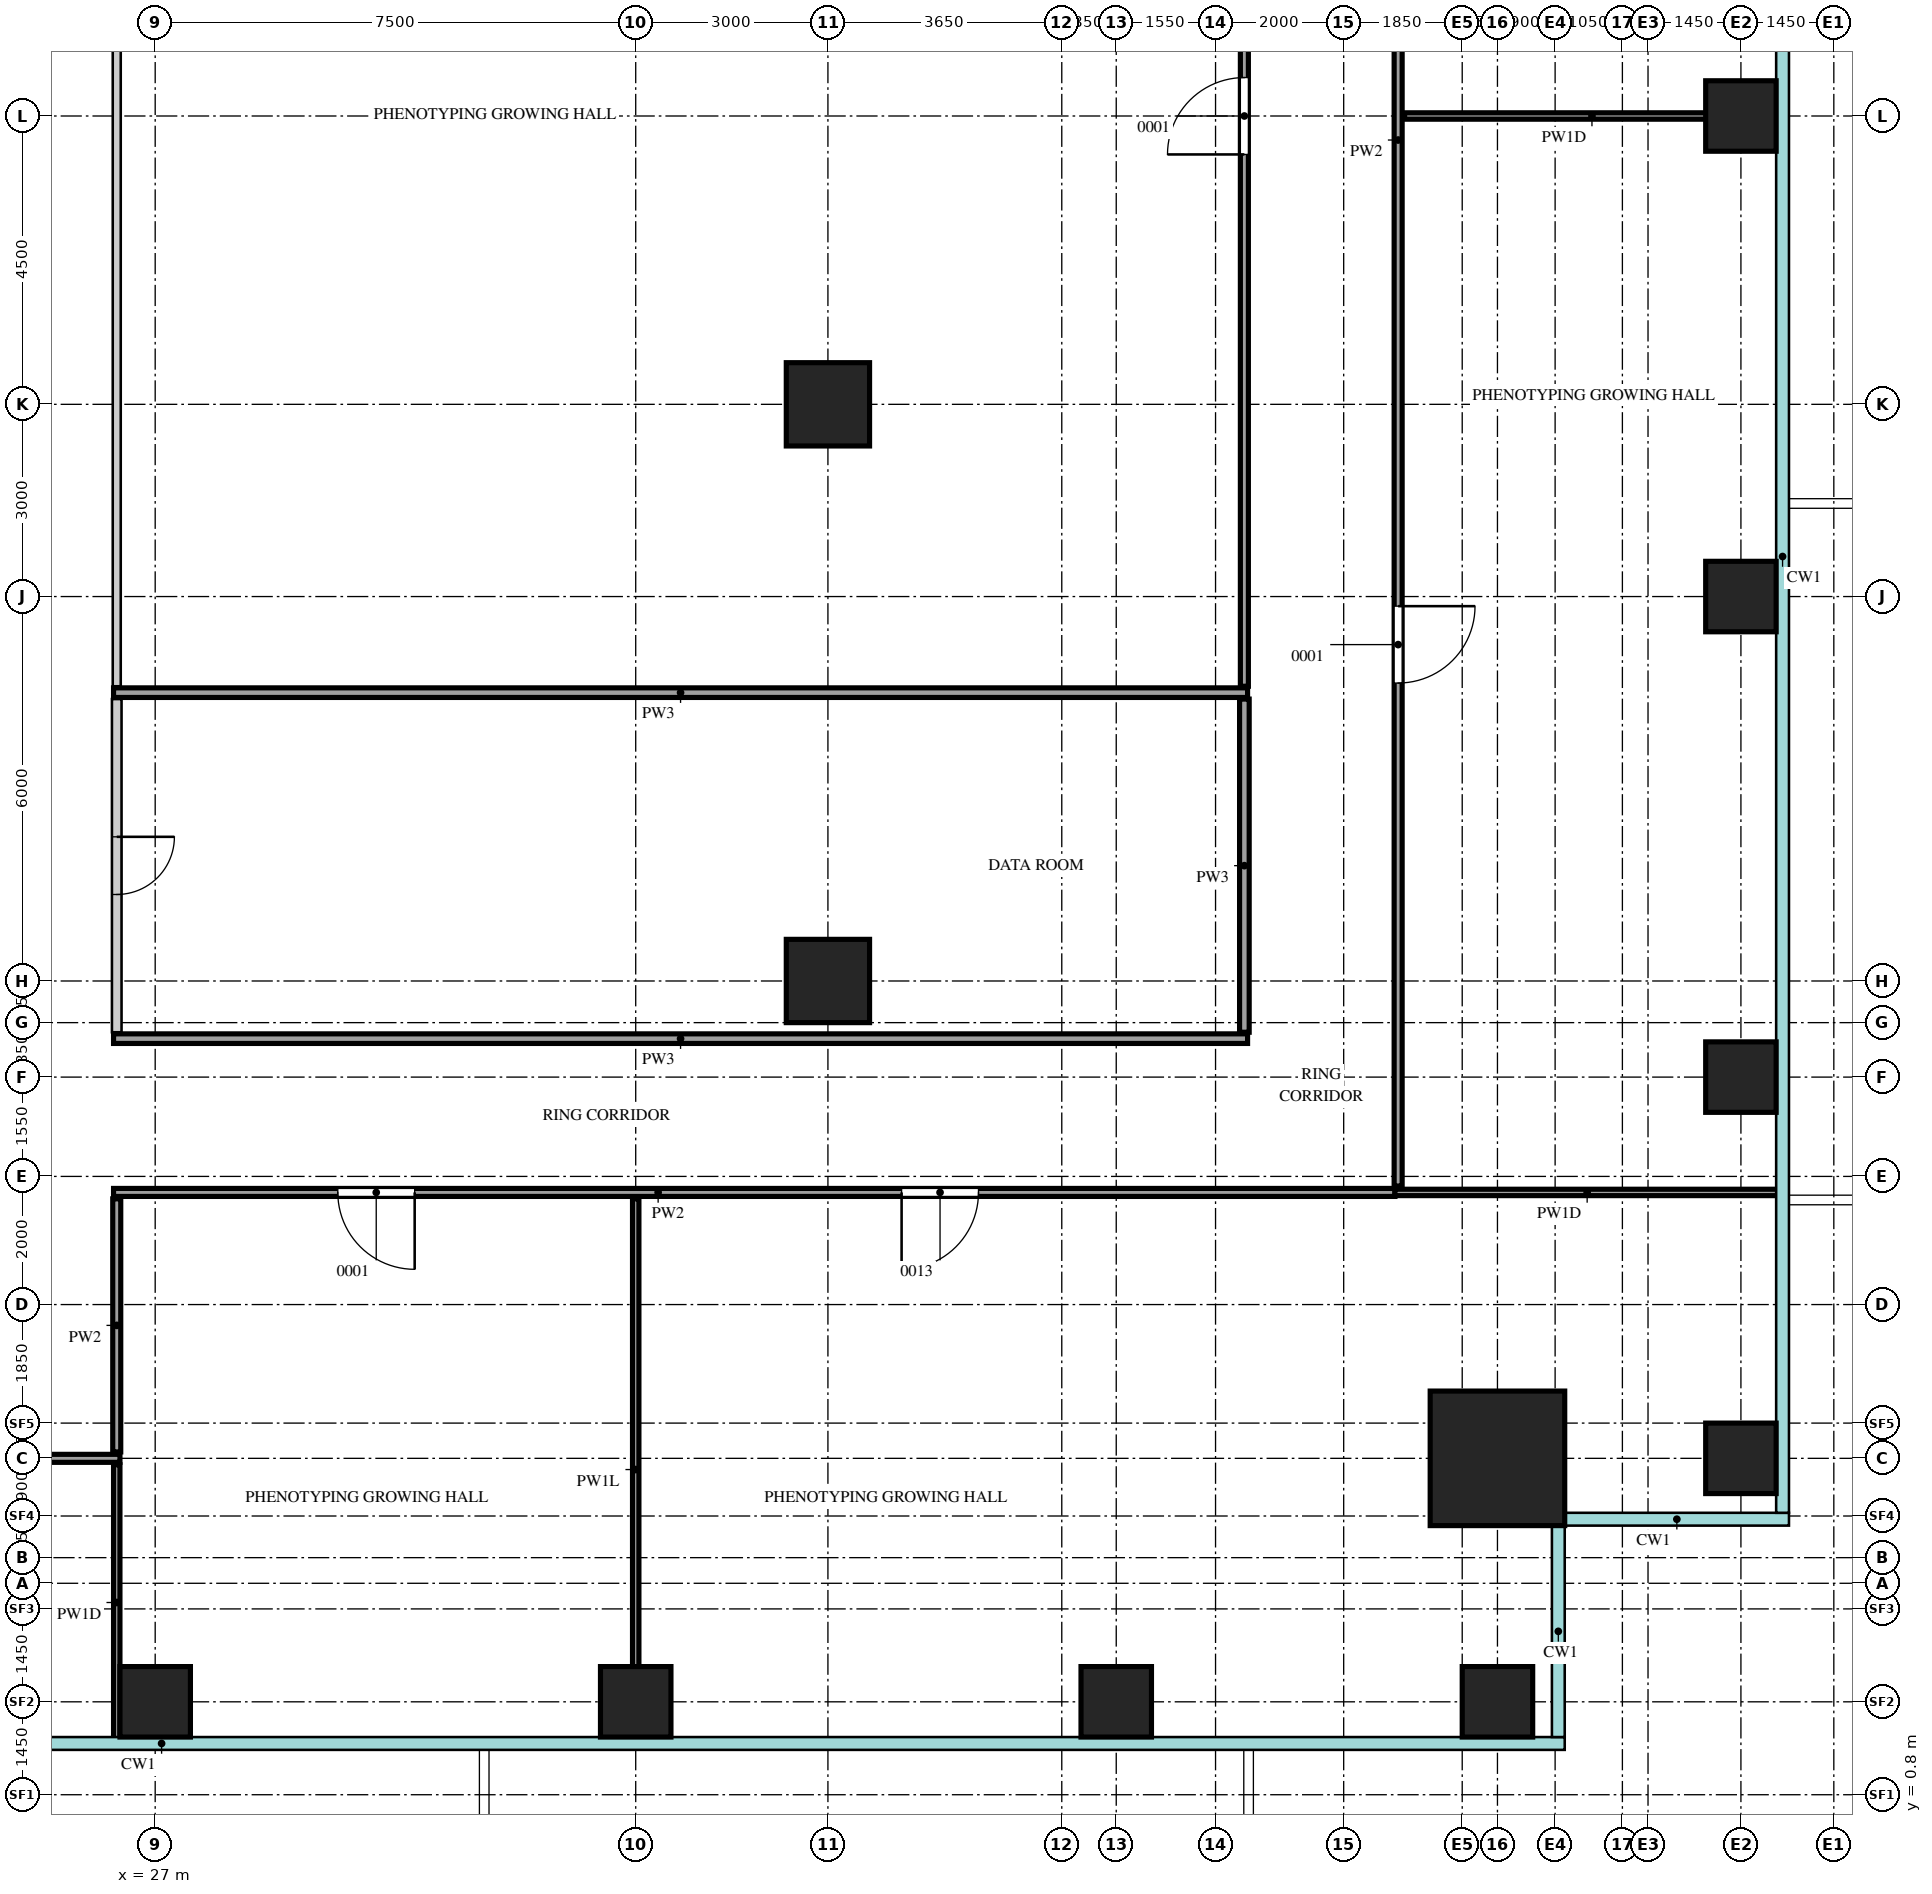
"""IFC4 building model, lengths in metres.
Left out: names, types, materials, properties, quantities, classifications, styles, units other than length and angle.
Written with IfcOpenShell. Run it as: python <this file> out.ifc"""

import sys

from ifc_helpers import new_model, si_unit, direction, frame, frame_2d, origin, origin_2d, place, context, subcontext, project, spatial, rectangle, extrude, source, transform, mapped, element, fill, save


model = new_model("IFC4")
c1 = context("Model", 3, precision=1e-05, world=origin(), true_north=direction((0.0, 1.0)))
c2 = subcontext(c1, "Body", "Model", "MODEL_VIEW")
j1 = project(units=[si_unit("LENGTHUNIT", "METRE"), si_unit("PLANEANGLEUNIT", "RADIAN")], contexts=[c1])
p1 = place(None, origin())
s1 = spatial("IfcSite", under=j1, at=p1, CompositionType="ELEMENT")
p2 = place(p1, origin())
s2 = spatial("IfcBuilding", under=s1, at=p2, CompositionType="ELEMENT")
p3 = place(p2, frame((0.0, 0.0, 136.7)))
s3 = spatial("IfcBuildingStorey", under=s2, at=p3, CompositionType="ELEMENT", Elevation=136.7)
m1 = source(origin(), c2, "Body", "SweptSolid", [
    extrude(rectangle(XDim=2.1, YDim=2.1, at=origin_2d()), origin(), (0.0, 0.0, 1.0), 4.4),
])
p4 = place(p3, frame((47.95, 6.05, 0.0), z_axis=(0.0, 0.0, 1.0), x_axis=(1.0, 0.0, 0.0)))
e1 = element("IfcColumn", 1, at=p4, inside=s3, PredefinedType="COLUMN", context=c2, shape_type="MappedRepresentation", body=[
    mapped(m1, transform((0.0, 0.0, 0.0))),
])
m2 = source(origin(), c2, "Body", "SweptSolid", [
    extrude(rectangle(XDim=1.1, YDim=1.1, at=origin_2d()), origin(), (0.0, 0.0, 1.0), 4.1),
])
for number, where, z_axis, x_axis in (
    (2, (27.0, 2.25, 0.0), (0.0, 0.0, 1.0), (1.0, 0.0, 0.0)),
    (3, (34.5, 2.25, 0.0), (0.0, 0.0, 1.0), (1.0, 0.0, 0.0)),
    (4, (42.0, 2.25, 0.0), (0.0, 0.0, 1.0), (1.0, 0.0, 0.0)),
    (5, (47.95, 2.25, 0.0), (0.0, 0.0, 1.0), (1.0, 0.0, 0.0)),
    (6, (51.75, 6.05, 0.0), (0.0, 0.0, 1.0), (1.0, 0.0, 0.0)),
    (7, (51.75, 12.0, 0.0), (0.0, 0.0, 1.0), (1.0, 0.0, 0.0)),
    (8, (51.75, 19.5, 0.0), (0.0, 0.0, 1.0), (1.0, 0.0, 0.0)),
    (9, (51.75, 27.0, 0.0), (0.0, 0.0, 1.0), (1.0, 0.0, 0.0)),
):
    element("IfcColumn", number, at=place(p3, frame(where, z_axis=z_axis, x_axis=x_axis)), inside=s3, PredefinedType="COLUMN", context=c2, shape_type="MappedRepresentation", body=[
        mapped(m2, transform((0.0, 0.0, 0.0))),
    ])
m3 = source(origin(), c2, "Body", "SweptSolid", [
    extrude(rectangle(XDim=1.3, YDim=1.3, at=origin_2d()), origin(), (0.0, 0.0, 1.0), 4.1),
])
for number, where, z_axis, x_axis in (
    (10, (37.5, 13.5, 0.0), (0.0, 0.0, 1.0), (1.0, 0.0, 0.0)),
    (11, (37.5, 22.5, 0.0), (0.0, 0.0, 1.0), (1.0, 0.0, 0.0)),
):
    element("IfcColumn", number, at=place(p3, frame(where, z_axis=z_axis, x_axis=x_axis)), inside=s3, PredefinedType="COLUMN", context=c2, shape_type="MappedRepresentation", body=[
        mapped(m3, transform((0.0, 0.0, 0.0))),
    ])
m4 = source(origin(), c2, "Body", "SweptSolid", [
    extrude(rectangle(XDim=4.3, YDim=0.1, at=frame_2d((2.15, 0.0))), origin(), (0.0, 0.0, 1.0), 4.2),
])
p5 = place(p3, frame((26.4, 1.65, 0.0), z_axis=(0.0, 0.0, 1.0), x_axis=(0.0, 1.0, 0.0)))
e12 = element("IfcWall", 12, at=p5, inside=s3, PredefinedType="PARTITIONING", context=c2, shape_type="MappedRepresentation", body=[
    mapped(m4, transform((0.0, 0.0, 0.0))),
])
m5 = source(origin(), c2, "Body", "SweptSolid", [
    extrude(rectangle(XDim=8.45, YDim=0.1, at=frame_2d((4.225, 0.0))), origin(), (0.0, 0.0, 1.0), 3.6),
])
p6 = place(p3, frame((34.5, 1.65, 0.0), z_axis=(0.0, 0.0, 1.0), x_axis=(0.0, 1.0, 0.0)))
e13 = element("IfcWall", 13, at=p6, inside=s3, PredefinedType="PARTITIONING", context=c2, shape_type="MappedRepresentation", body=[
    mapped(m5, transform((0.0, 0.0, 0.0))),
])
m6 = source(origin(), c2, "Body", "SweptSolid", [
    extrude(rectangle(XDim=22.3, YDim=0.125, at=frame_2d((11.15, 0.0))), origin(), (0.0, 0.0, 1.0), 3.55),
])
p7 = place(p3, frame((4.15, 6.05, 0.0), z_axis=(0.0, 0.0, 1.0), x_axis=(1.0, 0.0, 0.0)))
e14 = element("IfcWall", 14, at=p7, inside=s3, PredefinedType="PARTITIONING", context=c2, shape_type="MappedRepresentation", body=[
    mapped(m6, transform((0.0, 0.0, 0.0))),
])
m7 = source(origin(), c2, "Body", "SweptSolid", [
    extrude(rectangle(XDim=0.9, YDim=2.1, at=frame_2d((0.45, 1.05))), frame((0.0, 0.073, 0.0), z_axis=(0.0, -1.0, 0.0), x_axis=(1.0, 0.0, 0.0)), (0.0, 0.0, 1.0), 0.145),
])
p8 = place(p7, frame((10.7, 0.0, 0.0)))
e15 = element("IfcOpeningElement", 15, at=p8, cuts=e14, PredefinedType="OPENING", context=c2, shape_type="MappedRepresentation", body=[
    mapped(m7, transform((0.0, 0.0, 0.0))),
])
m8 = source(origin(), c2, "Body", "SweptSolid", [
    extrude(rectangle(XDim=3.95, YDim=0.125, at=frame_2d((1.975, 0.0))), origin(), (0.0, 0.0, 1.0), 4.2),
])
p9 = place(p3, frame((26.4, 6.15, 0.0), z_axis=(0.0, 0.0, 1.0), x_axis=(0.0, 1.0, 0.0)))
e16 = element("IfcWall", 16, at=p9, inside=s3, PredefinedType="PARTITIONING", context=c2, shape_type="MappedRepresentation", body=[
    mapped(m8, transform((0.0, 0.0, 0.0))),
])
m9 = source(origin(), c2, "Body", "SweptSolid", [
    extrude(rectangle(XDim=20.0, YDim=0.125, at=frame_2d((10.0, 0.0))), origin(), (0.0, 0.0, 1.0), 4.2),
])
p10 = place(p3, frame((26.35, 10.2, 0.0), z_axis=(0.0, 0.0, 1.0), x_axis=(1.0, 0.0, 0.0)))
e17 = element("IfcWall", 17, at=p10, inside=s3, PredefinedType="PARTITIONING", context=c2, shape_type="MappedRepresentation", body=[
    mapped(m9, transform((0.0, 0.0, 0.0))),
])
m10 = source(origin(), c2, "Body", "SweptSolid", [
    extrude(rectangle(XDim=1.2, YDim=2.1, at=frame_2d((0.6, 1.05))), frame((0.0, 0.073, 0.0), z_axis=(0.0, -1.0, 0.0), x_axis=(1.0, 0.0, 0.0)), (0.0, 0.0, 1.0), 0.145),
])
p11 = place(p10, frame((3.5, 0.0, 0.0)))
e18 = element("IfcOpeningElement", 18, at=p11, cuts=e17, PredefinedType="OPENING", context=c2, shape_type="MappedRepresentation", body=[
    mapped(m10, transform((0.0, 0.0, 0.0))),
])
p12 = place(p10, frame((12.3, 0.0, 0.0)))
e19 = element("IfcOpeningElement", 19, at=p12, cuts=e17, PredefinedType="OPENING", context=c2, shape_type="MappedRepresentation", body=[
    mapped(m10, transform((0.0, 0.0, 0.0))),
])
m11 = source(origin(), c2, "Body", "SweptSolid", [
    extrude(rectangle(XDim=6.0, YDim=0.1, at=frame_2d((3.0, 0.0))), origin(), (0.0, 0.0, 1.0), 4.2),
])
p13 = place(p3, frame((46.35, 10.2, 0.0), z_axis=(0.0, 0.0, 1.0), x_axis=(1.0, 0.0, 0.0)))
e20 = element("IfcWall", 20, at=p13, inside=s3, PredefinedType="PARTITIONING", context=c2, shape_type="MappedRepresentation", body=[
    mapped(m11, transform((0.0, 0.0, 0.0))),
])
m12 = source(origin(), c2, "Body", "SweptSolid", [
    extrude(rectangle(XDim=37.65, YDim=0.125, at=frame_2d((18.825, 0.0))), origin(), (0.0, 0.0, 1.0), 4.2),
])
p14 = place(p3, frame((46.4, 10.3, 0.0), z_axis=(0.0, 0.0, 1.0), x_axis=(0.0, 1.0, 0.0)))
e21 = element("IfcWall", 21, at=p14, inside=s3, PredefinedType="PARTITIONING", context=c2, shape_type="MappedRepresentation", body=[
    mapped(m12, transform((0.0, 0.0, 0.0))),
])
p15 = place(p14, frame((7.85, 0.0, 0.0)))
e22 = element("IfcOpeningElement", 22, at=p15, cuts=e21, PredefinedType="OPENING", context=c2, shape_type="MappedRepresentation", body=[
    mapped(m10, transform((0.0, 0.0, 0.0))),
])
p16 = place(p14, frame((23.6, 0.0, 0.0)))
e23 = element("IfcOpeningElement", 23, at=p16, cuts=e21, PredefinedType="OPENING", context=c2, shape_type="MappedRepresentation", body=[
    mapped(m7, transform((0.0, 0.0, 0.0))),
])
p17 = place(p14, frame((33.2, 0.0, 0.0)))
e24 = element("IfcOpeningElement", 24, at=p17, cuts=e21, PredefinedType="OPENING", context=c2, shape_type="MappedRepresentation", body=[
    mapped(m7, transform((0.0, 0.0, 0.0))),
])
m13 = source(origin(), c2, "Body", "SweptSolid", [
    extrude(rectangle(XDim=17.7, YDim=0.15, at=frame_2d((8.85, 0.0))), origin(), (0.0, 0.0, 1.0), 4.2),
])
p18 = place(p3, frame((26.35, 12.6, 0.0), z_axis=(0.0, 0.0, 1.0), x_axis=(1.0, 0.0, 0.0)))
e25 = element("IfcWall", 25, at=p18, inside=s3, PredefinedType="PARTITIONING", context=c2, shape_type="MappedRepresentation", body=[
    mapped(m13, transform((0.0, 0.0, 0.0))),
])
m14 = source(origin(), c2, "Body", "SweptSolid", [
    extrude(rectangle(XDim=5.2, YDim=0.15, at=frame_2d((2.6, 0.0))), origin(), (0.0, 0.0, 1.0), 4.2),
])
p19 = place(p3, frame((26.4, 12.7, 0.0), z_axis=(0.0, 0.0, 1.0), x_axis=(0.0, 1.0, 0.0)))
e26 = element("IfcWall", 26, at=p19, inside=s3, PredefinedType="PARTITIONING", context=c2, shape_type="MappedRepresentation", body=[
    mapped(m14, transform((0.0, 0.0, 0.0))),
])
m15 = source(origin(), c2, "Body", "SweptSolid", [
    extrude(rectangle(XDim=0.9, YDim=2.1, at=frame_2d((0.45, 1.05))), frame((0.0, 0.085, 0.0), z_axis=(0.0, -1.0, 0.0), x_axis=(1.0, 0.0, 0.0)), (0.0, 0.0, 1.0), 0.17),
])
p20 = place(p19, frame((2.15, 0.0, 0.0)))
e27 = element("IfcOpeningElement", 27, at=p20, cuts=e26, PredefinedType="OPENING", context=c2, shape_type="MappedRepresentation", body=[
    mapped(m15, transform((0.0, 0.0, 0.0))),
])
p21 = place(p3, frame((44.0, 12.7, 0.0), z_axis=(0.0, 0.0, 1.0), x_axis=(0.0, 1.0, 0.0)))
e28 = element("IfcWall", 28, at=p21, inside=s3, PredefinedType="PARTITIONING", context=c2, shape_type="MappedRepresentation", body=[
    mapped(m14, transform((0.0, 0.0, 0.0))),
])
p22 = place(p3, frame((26.35, 18.0, 0.0), z_axis=(0.0, 0.0, 1.0), x_axis=(1.0, 0.0, 0.0)))
e29 = element("IfcWall", 29, at=p22, inside=s3, PredefinedType="PARTITIONING", context=c2, shape_type="MappedRepresentation", body=[
    mapped(m13, transform((0.0, 0.0, 0.0))),
])
m16 = source(origin(), c2, "Body", "SweptSolid", [
    extrude(rectangle(XDim=17.8, YDim=0.125, at=frame_2d((8.9, 0.0))), origin(), (0.0, 0.0, 1.0), 4.2),
])
p23 = place(p3, frame((26.4, 18.1, 0.0), z_axis=(0.0, 0.0, 1.0), x_axis=(0.0, 1.0, 0.0)))
e30 = element("IfcWall", 30, at=p23, inside=s3, PredefinedType="PARTITIONING", context=c2, shape_type="MappedRepresentation", body=[
    mapped(m16, transform((0.0, 0.0, 0.0))),
])
m17 = source(origin(), c2, "Body", "SweptSolid", [
    extrude(rectangle(XDim=27.45, YDim=0.125, at=frame_2d((13.725, 0.0))), origin(), (0.0, 0.0, 1.0), 4.2),
])
p24 = place(p3, frame((44.0, 18.1, 0.0), z_axis=(0.0, 0.0, 1.0), x_axis=(0.0, 1.0, 0.0)))
e31 = element("IfcWall", 31, at=p24, inside=s3, PredefinedType="PARTITIONING", context=c2, shape_type="MappedRepresentation", body=[
    mapped(m17, transform((0.0, 0.0, 0.0))),
])
p25 = place(p24, frame((8.3, 0.0, 0.0)))
e32 = element("IfcOpeningElement", 32, at=p25, cuts=e31, PredefinedType="OPENING", context=c2, shape_type="MappedRepresentation", body=[
    mapped(m10, transform((0.0, 0.0, 0.0))),
])
p26 = place(p24, frame((22.1, 0.0, 0.0)))
e33 = element("IfcOpeningElement", 33, at=p26, cuts=e31, PredefinedType="OPENING", context=c2, shape_type="MappedRepresentation", body=[
    mapped(m10, transform((0.0, 0.0, 0.0))),
])
m18 = source(origin(), c2, "Body", "SweptSolid", [
    extrude(rectangle(XDim=5.85, YDim=0.1, at=frame_2d((2.925, 0.0))), origin(), (0.0, 0.0, 1.0), 4.2),
])
p27 = place(p3, frame((46.5, 27.0, 0.0), z_axis=(0.0, 0.0, 1.0), x_axis=(1.0, 0.0, 0.0)))
e34 = element("IfcWall", 34, at=p27, inside=s3, PredefinedType="PARTITIONING", context=c2, shape_type="MappedRepresentation", body=[
    mapped(m18, transform((0.0, 0.0, 0.0))),
])
m19 = source(origin(), c2, "Body", "SweptSolid", [
    extrude(rectangle(XDim=1.2, YDim=2.1, at=frame_2d((0.6, 1.05))), frame((0.0, 0.025, 0.0), z_axis=(0.0, -1.0, 0.0), x_axis=(1.0, 0.0, 0.0)), (0.0, 0.0, 1.0), 0.05),
])
p28 = place(p11, origin())
e35 = element("IfcDoor", 35, at=p28, inside=s3, OperationType="SINGLE_SWING_RIGHT", PredefinedType="DOOR", context=c2, shape_type="MappedRepresentation", body=[
    mapped(m19, transform((0.0, 0.0, 0.0))),
])
fill(e18, e35)
p29 = place(p12, origin())
e36 = element("IfcDoor", 36, at=p29, inside=s3, OperationType="SINGLE_SWING_LEFT", PredefinedType="DOOR", context=c2, shape_type="MappedRepresentation", body=[
    mapped(m19, transform((0.0, 0.0, 0.0))),
])
fill(e19, e36)
m20 = source(origin(), c2, "Body", "SweptSolid", [
    extrude(rectangle(XDim=0.9, YDim=2.1, at=frame_2d((0.45, 1.05))), frame((0.0, 0.025, 0.0), z_axis=(0.0, -1.0, 0.0), x_axis=(1.0, 0.0, 0.0)), (0.0, 0.0, 1.0), 0.05),
])
p30 = place(p20, origin())
e37 = element("IfcDoor", 37, at=p30, inside=s3, OperationType="SINGLE_SWING_RIGHT", PredefinedType="DOOR", context=c2, shape_type="MappedRepresentation", body=[
    mapped(m20, transform((0.0, 0.0, 0.0))),
])
fill(e27, e37)
p31 = place(p25, origin())
e38 = element("IfcDoor", 38, at=p31, inside=s3, OperationType="SINGLE_SWING_RIGHT", PredefinedType="DOOR", context=c2, shape_type="MappedRepresentation", body=[
    mapped(m19, transform((0.0, 0.0, 0.0))),
])
fill(e32, e38)
p32 = place(p15, origin())
e39 = element("IfcDoor", 39, at=p32, inside=s3, OperationType="SINGLE_SWING_RIGHT", PredefinedType="DOOR", context=c2, shape_type="MappedRepresentation", body=[
    mapped(m19, transform((0.0, 0.0, 0.0))),
])
fill(e22, e39)
save(model, sys.argv[1])
